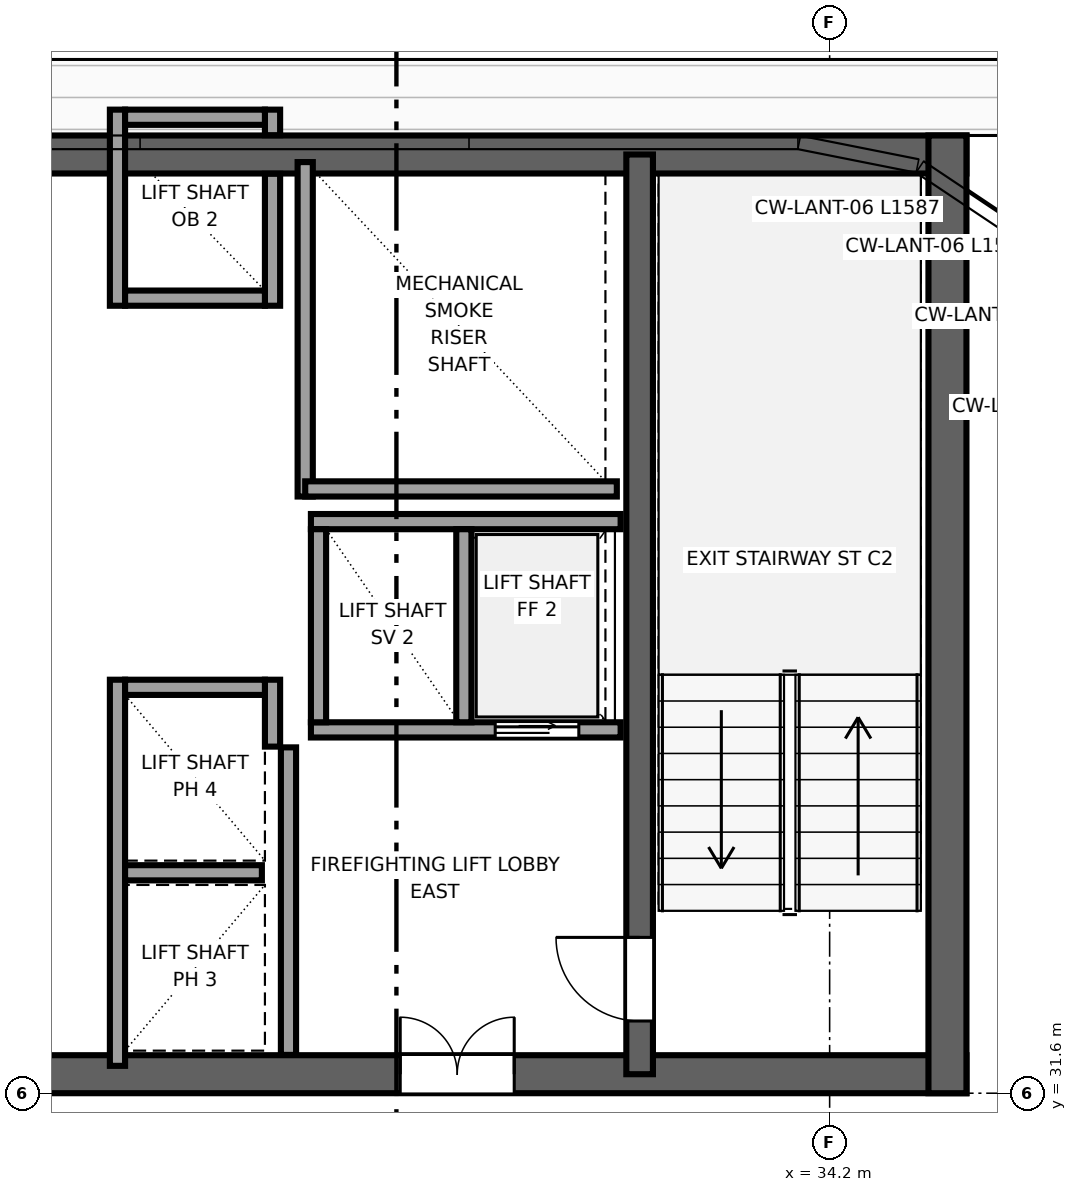
"""IFC4 building model, lengths in metres.
Left out: names, types, materials, properties, quantities, classifications, styles, units other than length and angle.
Written with IfcOpenShell. Run it as: python <this file> out.ifc"""

import sys

from ifc_helpers import new_model, si_unit, direction, frame, frame_2d, origin, place, context, subcontext, project, spatial, rectangle, extrude, source, transform, mapped, element, fill, save


model = new_model("IFC4")
c1 = context("Model", 3, precision=1e-05, world=origin(), true_north=direction((0.0, 1.0)))
c2 = subcontext(c1, "Body", "Model", "MODEL_VIEW")
j1 = project(units=[si_unit("LENGTHUNIT", "METRE"), si_unit("PLANEANGLEUNIT", "RADIAN")], contexts=[c1])
p1 = place(None, origin())
s1 = spatial("IfcSite", under=j1, at=p1, CompositionType="ELEMENT")
p2 = place(p1, origin())
s2 = spatial("IfcBuilding", under=s1, at=p2, CompositionType="ELEMENT")
p3 = place(p2, frame((0.0, 0.0, 290.95)))
s3 = spatial("IfcBuildingStorey", under=s2, at=p3, CompositionType="ELEMENT", Elevation=290.95)
p4 = place(p3, frame((10.0, 31.85, 0.0), z_axis=(0.0, 0.0, 1.0), x_axis=(1.0, 0.0, 0.0)))
e1 = element("IfcWall", 1, at=p4, inside=s3, PredefinedType="SHEAR", context=c2, shape_type="SweptSolid", body=[
    extrude(rectangle(XDim=26.0, YDim=0.5, at=frame_2d((13.0, 0.0))), origin(), (0.0, 0.0, 1.0), 3.8),
])
p5 = place(p4, frame((7.45, 0.0, 0.0), z_axis=(0.0, 0.0, 1.0), x_axis=(-1.0, 0.0, 0.0)))
e2 = element("IfcOpeningElement", 2, at=p5, cuts=e1, PredefinedType="OPENING", context=c2, shape_type="SweptSolid", body=[
    extrude(rectangle(XDim=1.5, YDim=2.04, at=frame_2d((0.75, 1.02))), frame((0.0, 0.26, 0.0), z_axis=(0.0, -1.0, 0.0), x_axis=(1.0, 0.0, 0.0)), (0.0, 0.0, 1.0), 0.52),
])
p6 = place(p4, frame((13.75, 0.0, 0.0), z_axis=(0.0, 0.0, 1.0), x_axis=(-1.0, 0.0, 0.0)))
e3 = element("IfcOpeningElement", 3, at=p6, cuts=e1, PredefinedType="OPENING", context=c2, shape_type="SweptSolid", body=[
    extrude(rectangle(XDim=1.5, YDim=2.04, at=frame_2d((0.75, 1.02))), frame((0.0, 0.26, 0.0), z_axis=(0.0, -1.0, 0.0), x_axis=(1.0, 0.0, 0.0)), (0.0, 0.0, 1.0), 0.52),
])
p7 = place(p4, frame((20.05, 0.0, 0.0), z_axis=(0.0, 0.0, 1.0), x_axis=(-1.0, 0.0, 0.0)))
e4 = element("IfcOpeningElement", 4, at=p7, cuts=e1, PredefinedType="OPENING", context=c2, shape_type="SweptSolid", body=[
    extrude(rectangle(XDim=1.5, YDim=2.04, at=frame_2d((0.75, 1.02))), frame((0.0, 0.26, 0.0), z_axis=(0.0, -1.0, 0.0), x_axis=(1.0, 0.0, 0.0)), (0.0, 0.0, 1.0), 0.52),
])
p8 = place(p3, frame((10.0, 43.95, 0.0), z_axis=(0.0, 0.0, 1.0), x_axis=(1.0, 0.0, 0.0)))
e5 = element("IfcWall", 5, at=p8, inside=s3, PredefinedType="SHEAR", context=c2, shape_type="SweptSolid", body=[
    extrude(rectangle(XDim=26.0, YDim=0.5, at=frame_2d((13.0, 0.0))), origin(), (0.0, 0.0, 1.0), 3.8),
])
p9 = place(p3, frame((35.75, 31.6, 0.0), z_axis=(0.0, 0.0, 1.0), x_axis=(0.0, 1.0, 0.0)))
e6 = element("IfcWall", 6, at=p9, inside=s3, PredefinedType="SHEAR", context=c2, shape_type="SweptSolid", body=[
    extrude(rectangle(XDim=12.6, YDim=0.5, at=frame_2d((6.3, 0.0))), origin(), (0.0, 0.0, 1.0), 3.8),
])
p10 = place(p3, frame((31.7, 31.85, 0.0), z_axis=(0.0, 0.0, 1.0), x_axis=(0.0, 1.0, 0.0)))
e7 = element("IfcWall", 7, at=p10, inside=s3, PredefinedType="SHEAR", context=c2, shape_type="SweptSolid", body=[
    extrude(rectangle(XDim=12.1, YDim=0.35, at=frame_2d((6.05, 0.0))), origin(), (0.0, 0.0, 1.0), 3.8),
])
p11 = place(p10, frame((1.8, 0.0, 0.0), z_axis=(0.0, 0.0, 1.0), x_axis=(-1.0, 0.0, 0.0)))
e8 = element("IfcOpeningElement", 8, at=p11, cuts=e7, PredefinedType="OPENING", context=c2, shape_type="SweptSolid", body=[
    extrude(rectangle(XDim=1.1, YDim=2.12, at=frame_2d((0.55, 1.06))), frame((0.0, 0.185, 0.0), z_axis=(0.0, -1.0, 0.0), x_axis=(1.0, 0.0, 0.0)), (0.0, 0.0, 1.0), 0.37),
])
p12 = place(p3, frame((27.3, 39.45, 0.0), z_axis=(0.0, 0.0, 1.0), x_axis=(0.0, 1.0, 0.0)))
e9 = element("IfcWall", 9, at=p12, inside=s3, PredefinedType="SOLIDWALL", context=c2, shape_type="SweptSolid", body=[
    extrude(rectangle(XDim=4.4, YDim=0.2, at=frame_2d((2.2, 0.0))), origin(), (0.0, 0.0, 1.0), 3.58),
])
p13 = place(p3, frame((27.3, 39.55, 0.0), z_axis=(0.0, 0.0, 1.0), x_axis=(1.0, 0.0, 0.0)))
e10 = element("IfcWall", 10, at=p13, inside=s3, PredefinedType="SOLIDWALL", context=c2, shape_type="SweptSolid", body=[
    extrude(rectangle(XDim=4.1, YDim=0.2, at=frame_2d((2.05, 0.0))), origin(), (0.0, 0.0, 1.0), 3.58),
])
p14 = place(p3, frame((27.08, 32.104, 0.0), z_axis=(0.0, 0.0, 1.0), x_axis=(0.0, 1.0, 0.0)))
e11 = element("IfcWall", 11, at=p14, inside=s3, PredefinedType="SOLIDWALL", context=c2, shape_type="SweptSolid", body=[
    extrude(rectangle(XDim=4.046, YDim=0.2, at=frame_2d((2.023, 0.0))), origin(), (0.0, 0.0, 1.0), 3.58),
])
p15 = place(p3, frame((27.375, 36.38, 0.0), z_axis=(0.0, 0.0, 1.0), x_axis=(1.0, 0.0, 0.0)))
e12 = element("IfcWall", 12, at=p15, inside=s3, PredefinedType="SOLIDWALL", context=c2, shape_type="SweptSolid", body=[
    extrude(rectangle(XDim=4.075, YDim=0.2, at=frame_2d((2.038, 0.0))), origin(), (0.0, 0.0, 1.0), 3.58),
])
p16 = place(p15, frame((2.425, 0.0, 0.0)))
e13 = element("IfcOpeningElement", 13, at=p16, cuts=e12, PredefinedType="OPENING", context=c2, shape_type="SweptSolid", body=[
    extrude(rectangle(XDim=1.1, YDim=2.12, at=frame_2d((0.55, 1.06))), frame((0.0, 0.11, 0.0), z_axis=(0.0, -1.0, 0.0), x_axis=(1.0, 0.0, 0.0)), (0.0, 0.0, 1.0), 0.22),
])
p17 = place(p3, frame((27.375, 39.12, 0.0), z_axis=(0.0, 0.0, 1.0), x_axis=(1.0, 0.0, 0.0)))
e14 = element("IfcWall", 14, at=p17, inside=s3, PredefinedType="SOLIDWALL", context=c2, shape_type="SweptSolid", body=[
    extrude(rectangle(XDim=4.075, YDim=0.2, at=frame_2d((2.038, 0.0))), origin(), (0.0, 0.0, 1.0), 3.58),
])
for number, where, z_axis, x_axis in (
    (15, (27.475, 36.48, 0.0), (0.0, 0.0, 1.0), (0.0, 1.0, 0.0)),
    (16, (29.387, 36.48, 0.0), (0.0, 0.0, 1.0), (0.0, 1.0, 0.0)),
):
    element("IfcWall", number, at=place(p3, frame(where, z_axis=z_axis, x_axis=x_axis)), inside=s3, PredefinedType="SOLIDWALL", context=c2, shape_type="SweptSolid", body=[
        extrude(rectangle(XDim=2.54, YDim=0.2, at=frame_2d((1.27, 0.0))), origin(), (0.0, 0.0, 1.0), 3.58),
    ])
p18 = place(p3, frame((24.83, 31.96, 0.0), z_axis=(0.0, 0.0, 1.0), x_axis=(0.0, 1.0, 0.0)))
e17 = element("IfcWall", 17, at=p18, inside=s3, PredefinedType="SOLIDWALL", context=c2, shape_type="SweptSolid", body=[
    extrude(rectangle(XDim=5.08, YDim=0.2, at=frame_2d((2.54, 0.0))), origin(), (0.0, 0.0, 1.0), 3.58),
])
p19 = place(p3, frame((26.87, 36.16, 0.0), z_axis=(0.0, 0.0, 1.0), x_axis=(0.0, 1.0, 0.0)))
e18 = element("IfcWall", 18, at=p19, inside=s3, PredefinedType="SOLIDWALL", context=c2, shape_type="SweptSolid", body=[
    extrude(rectangle(XDim=0.88, YDim=0.2, at=frame_2d((0.44, 0.0))), origin(), (0.0, 0.0, 1.0), 3.58),
])
p20 = place(p3, frame((24.93, 36.94, 0.0), z_axis=(0.0, 0.0, 1.0), x_axis=(1.0, 0.0, 0.0)))
e19 = element("IfcWall", 19, at=p20, inside=s3, PredefinedType="SOLIDWALL", context=c2, shape_type="SweptSolid", body=[
    extrude(rectangle(XDim=1.84, YDim=0.2, at=frame_2d((0.92, 0.0))), origin(), (0.0, 0.0, 1.0), 3.58),
])
p21 = place(p3, frame((24.93, 34.5, 0.0), z_axis=(0.0, 0.0, 1.0), x_axis=(1.0, 0.0, 0.0)))
e20 = element("IfcWall", 20, at=p21, inside=s3, PredefinedType="SOLIDWALL", context=c2, shape_type="SweptSolid", body=[
    extrude(rectangle(XDim=1.8, YDim=0.2, at=frame_2d((0.9, 0.0))), origin(), (0.0, 0.0, 1.0), 3.58),
])
p22 = place(p3, frame((24.83, 41.96, 0.0), z_axis=(0.0, 0.0, 1.0), x_axis=(0.0, 1.0, 0.0)))
e21 = element("IfcWall", 21, at=p22, inside=s3, PredefinedType="SOLIDWALL", context=c2, shape_type="SweptSolid", body=[
    extrude(rectangle(XDim=2.58, YDim=0.2, at=frame_2d((1.29, 0.0))), origin(), (0.0, 0.0, 1.0), 3.58),
])
p23 = place(p3, frame((26.87, 41.96, 0.0), z_axis=(0.0, 0.0, 1.0), x_axis=(0.0, 1.0, 0.0)))
e22 = element("IfcWall", 22, at=p23, inside=s3, PredefinedType="SOLIDWALL", context=c2, shape_type="SweptSolid", body=[
    extrude(rectangle(XDim=1.736, YDim=0.2, at=frame_2d((0.868, 0.0))), origin(), (0.0, 0.0, 1.0), 3.58),
])
p24 = place(p3, frame((26.87, 44.204, 0.0), z_axis=(0.0, 0.0, 1.0), x_axis=(0.0, 1.0, 0.0)))
e23 = element("IfcWall", 23, at=p24, inside=s3, PredefinedType="SOLIDWALL", context=c2, shape_type="SweptSolid", body=[
    extrude(rectangle(XDim=0.336, YDim=0.2, at=frame_2d((0.168, 0.0))), origin(), (0.0, 0.0, 1.0), 3.58),
])
for number, where, z_axis, x_axis in (
    (24, (24.93, 42.06, 0.0), (0.0, 0.0, 1.0), (1.0, 0.0, 0.0)),
    (25, (24.93, 44.44, 0.0), (0.0, 0.0, 1.0), (1.0, 0.0, 0.0)),
):
    element("IfcWall", number, at=place(p3, frame(where, z_axis=z_axis, x_axis=x_axis)), inside=s3, PredefinedType="SOLIDWALL", context=c2, shape_type="SweptSolid", body=[
        extrude(rectangle(XDim=1.84, YDim=0.2, at=frame_2d((0.92, 0.0))), origin(), (0.0, 0.0, 1.0), 3.58),
    ])
m1 = source(origin(), c2, "Body", "SweptSolid", [
    extrude(rectangle(XDim=1.1, YDim=2.12, at=frame_2d((0.55, 1.06))), frame((0.0, 0.025, 0.0), z_axis=(0.0, -1.0, 0.0), x_axis=(1.0, 0.0, 0.0)), (0.0, 0.0, 1.0), 0.05),
])
p25 = place(p11, origin())
e26 = element("IfcDoor", 26, at=p25, inside=s3, OperationType="SINGLE_SWING_RIGHT", PredefinedType="DOOR", context=c2, shape_type="MappedRepresentation", body=[
    mapped(m1, transform((0.0, 0.0, 0.0), x_axis=(1.0, 0.0, 0.0), y_axis=(0.0, 1.0, 0.0), z_axis=(0.0, 0.0, 1.0), scale=1.0)),
])
fill(e8, e26)
m2 = source(origin(), c2, "Body", "SweptSolid", [
    extrude(rectangle(XDim=1.5, YDim=2.04, at=frame_2d((0.75, 1.02))), frame((0.0, 0.025, 0.0), z_axis=(0.0, -1.0, 0.0), x_axis=(1.0, 0.0, 0.0)), (0.0, 0.0, 1.0), 0.05),
])
p26 = place(p7, origin())
e27 = element("IfcDoor", 27, at=p26, inside=s3, OperationType="DOUBLE_DOOR_SINGLE_SWING", PredefinedType="DOOR", context=c2, shape_type="MappedRepresentation", body=[
    mapped(m2, transform((0.0, 0.0, 0.0), x_axis=(1.0, 0.0, 0.0), y_axis=(0.0, 1.0, 0.0), z_axis=(0.0, 0.0, 1.0), scale=1.0)),
])
fill(e4, e27)
m3 = source(origin(), c2, "Body", "SweptSolid", [
    extrude(rectangle(XDim=1.1, YDim=2.12, at=frame_2d((0.55, 1.06))), frame((0.0, 0.025, 0.0), z_axis=(0.0, -1.0, 0.0), x_axis=(1.0, 0.0, 0.0)), (0.0, 0.0, 1.0), 0.05),
])
p27 = place(p16, origin())
e28 = element("IfcDoor", 28, at=p27, inside=s3, OperationType="SLIDING_TO_RIGHT", PredefinedType="DOOR", context=c2, shape_type="MappedRepresentation", body=[
    mapped(m3, transform((0.0, 0.0, 0.0), x_axis=(1.0, 0.0, 0.0), y_axis=(0.0, 1.0, 0.0), z_axis=(0.0, 0.0, 1.0), scale=1.0)),
])
fill(e13, e28)
save(model, sys.argv[1])
